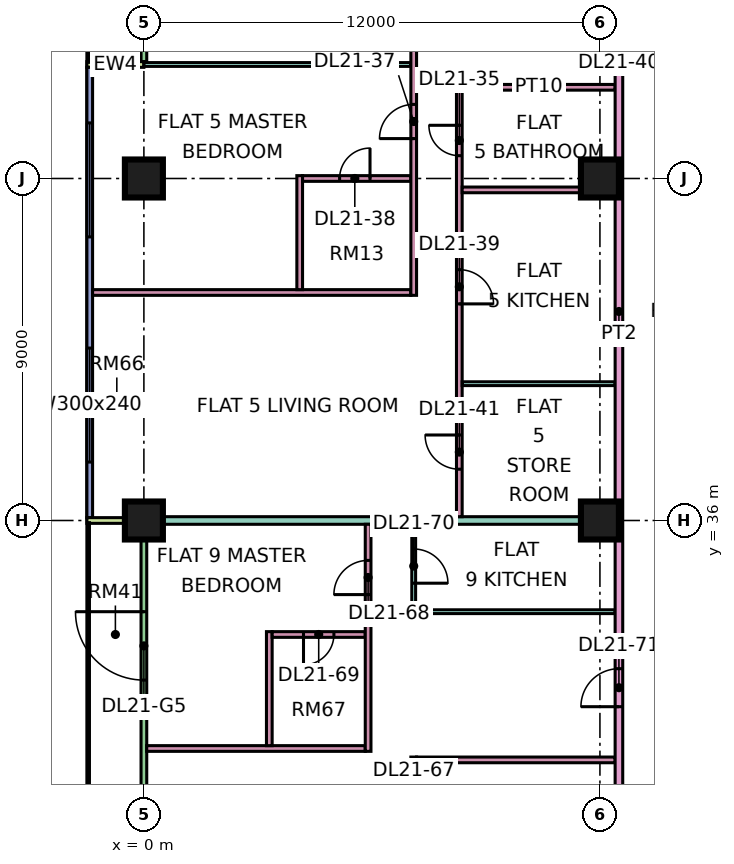
"""IFC4 building model, lengths in metres.
Left out: names, types, materials, properties, quantities, classifications, styles, units other than length and angle.
Written with IfcOpenShell. Run it as: python <this file> out.ifc"""

import sys

from ifc_helpers import new_model, si_unit, direction, frame, frame_2d, origin, origin_2d, place, context, subcontext, project, spatial, rectangle, extrude, element, fill, save


model = new_model("IFC4")
c1 = context("Model", 3, precision=1e-05, world=origin(), true_north=direction((0.0, 1.0)))
c2 = subcontext(c1, "Body", "Model", "MODEL_VIEW")
j1 = project(units=[si_unit("LENGTHUNIT", "METRE"), si_unit("PLANEANGLEUNIT", "RADIAN")], contexts=[c1])
p1 = place(None, origin())
s1 = spatial("IfcSite", under=j1, at=p1, CompositionType="ELEMENT")
p2 = place(p1, origin())
s2 = spatial("IfcBuilding", under=s1, at=p2, CompositionType="ELEMENT")
p3 = place(p2, frame((0.0, 0.0, 95.65)))
s3 = spatial("IfcBuildingStorey", under=s2, at=p3, CompositionType="ELEMENT", Elevation=95.65)
p4 = place(p3, frame((0.0, 36.0, 0.0), z_axis=(0.0, 0.0, 1.0), x_axis=(1.0, 0.0, 0.0)))
e1 = element("IfcColumn", 1, at=p4, inside=s3, PredefinedType="COLUMN", context=c2, shape_type="SweptSolid", body=[
    extrude(rectangle(XDim=1.0, YDim=1.0, at=origin_2d()), origin(), (0.0, 0.0, 1.0), 3.75),
])
for number, where, z_axis, x_axis in (
    (2, (0.0, 45.0, 0.0), (0.0, 0.0, 1.0), (1.0, 0.0, 0.0)),
    (3, (12.0, 36.0, 0.0), (0.0, 0.0, 1.0), (1.0, 0.0, 0.0)),
    (4, (12.0, 45.0, 0.0), (0.0, 0.0, 1.0), (1.0, 0.0, 0.0)),
):
    element("IfcColumn", number, at=place(p3, frame(where, z_axis=z_axis, x_axis=x_axis)), inside=s3, PredefinedType="COLUMN", context=c2, shape_type="SweptSolid", body=[
        extrude(rectangle(XDim=1.0, YDim=1.0, at=origin_2d()), origin(), (0.0, 0.0, 1.0), 3.75),
    ])
p5 = place(p3, frame((0.0, 61.425, 0.0), z_axis=(0.0, 0.0, 1.0), x_axis=(0.0, -1.0, 0.0)))
e5 = element("IfcWall", 5, at=p5, inside=s3, PredefinedType="SOLIDWALL", context=c2, shape_type="SweptSolid", body=[
    extrude(rectangle(XDim=13.35, YDim=0.15, at=frame_2d((6.675, 0.0))), origin(), (0.0, 0.0, 1.0), 3.35),
])
p6 = place(p5, frame((2.025, 0.0, 0.0)))
e6 = element("IfcOpeningElement", 6, at=p6, cuts=e5, PredefinedType="OPENING", context=c2, shape_type="SweptSolid", body=[
    extrude(rectangle(XDim=1.8, YDim=2.4, at=frame_2d((0.9, 1.2))), frame((0.0, 0.085, 0.0), z_axis=(0.0, -1.0, 0.0), x_axis=(1.0, 0.0, 0.0)), (0.0, 0.0, 1.0), 0.17),
])
p7 = place(p5, frame((5.025, 0.0, 0.45)))
e7 = element("IfcOpeningElement", 7, at=p7, cuts=e5, PredefinedType="OPENING", context=c2, shape_type="SweptSolid", body=[
    extrude(rectangle(XDim=1.2, YDim=2.4, at=frame_2d((0.6, 1.2))), frame((0.0, 0.085, 0.0), z_axis=(0.0, -1.0, 0.0), x_axis=(1.0, 0.0, 0.0)), (0.0, 0.0, 1.0), 0.17),
])
p8 = place(p5, frame((8.625, 0.0, 0.45)))
e8 = element("IfcOpeningElement", 8, at=p8, cuts=e5, PredefinedType="OPENING", context=c2, shape_type="SweptSolid", body=[
    extrude(rectangle(XDim=1.2, YDim=2.4, at=frame_2d((0.6, 1.2))), frame((0.0, 0.085, 0.0), z_axis=(0.0, -1.0, 0.0), x_axis=(1.0, 0.0, 0.0)), (0.0, 0.0, 1.0), 0.17),
])
p9 = place(p5, frame((10.988, 0.0, 0.45)))
e9 = element("IfcOpeningElement", 9, at=p9, cuts=e5, PredefinedType="OPENING", context=c2, shape_type="SweptSolid", body=[
    extrude(rectangle(XDim=1.8, YDim=2.4, at=frame_2d((0.9, 1.2))), frame((0.0, 0.085, 0.0), z_axis=(0.0, -1.0, 0.0), x_axis=(1.0, 0.0, 0.0)), (0.0, 0.0, 1.0), 0.17),
])
p10 = place(p3, frame((-1.5, 48.0, 0.0), z_axis=(0.0, 0.0, 1.0), x_axis=(1.0, 0.0, 0.0)))
e10 = element("IfcWall", 10, at=p10, inside=s3, PredefinedType="SOLIDWALL", context=c2, shape_type="SweptSolid", body=[
    extrude(rectangle(XDim=1.5, YDim=0.15, at=frame_2d((0.75, 0.0))), origin(), (0.0, 0.0, 1.0), 3.35),
])
p11 = place(p3, frame((-1.425, 47.925, 0.0), z_axis=(0.0, 0.0, 1.0), x_axis=(0.0, -1.0, 0.0)))
e11 = element("IfcWall", 11, at=p11, inside=s3, PredefinedType="SOLIDWALL", context=c2, shape_type="SweptSolid", body=[
    extrude(rectangle(XDim=11.85, YDim=0.15, at=frame_2d((5.925, 0.0))), origin(), (0.0, 0.0, 1.0), 3.35),
])
p12 = place(p11, frame((1.462, 0.0, 0.45)))
e12 = element("IfcOpeningElement", 12, at=p12, cuts=e11, PredefinedType="OPENING", context=c2, shape_type="SweptSolid", body=[
    extrude(rectangle(XDim=3.0, YDim=2.4, at=frame_2d((1.5, 1.2))), frame((0.0, 0.085, 0.0), z_axis=(0.0, -1.0, 0.0), x_axis=(1.0, 0.0, 0.0)), (0.0, 0.0, 1.0), 0.17),
])
p13 = place(p11, frame((7.387, 0.0, 0.45)))
e13 = element("IfcOpeningElement", 13, at=p13, cuts=e11, PredefinedType="OPENING", context=c2, shape_type="SweptSolid", body=[
    extrude(rectangle(XDim=3.0, YDim=2.4, at=frame_2d((1.5, 1.2))), frame((0.0, 0.085, 0.0), z_axis=(0.0, -1.0, 0.0), x_axis=(1.0, 0.0, 0.0)), (0.0, 0.0, 1.0), 0.17),
])
p14 = place(p3, frame((0.0, 35.925, 0.0), z_axis=(0.0, 0.0, 1.0), x_axis=(0.0, -1.0, 0.0)))
e14 = element("IfcWall", 14, at=p14, inside=s3, PredefinedType="SOLIDWALL", context=c2, shape_type="SweptSolid", body=[
    extrude(rectangle(XDim=11.85, YDim=0.15, at=frame_2d((5.925, 0.0))), origin(), (0.0, 0.0, 1.0), 3.35),
])
p15 = place(p14, frame((2.325, 0.0, 0.0)))
e15 = element("IfcOpeningElement", 15, at=p15, cuts=e14, PredefinedType="OPENING", context=c2, shape_type="SweptSolid", body=[
    extrude(rectangle(XDim=1.8, YDim=2.4, at=frame_2d((0.9, 1.2))), frame((0.0, 0.085, 0.0), z_axis=(0.0, -1.0, 0.0), x_axis=(1.0, 0.0, 0.0)), (0.0, 0.0, 1.0), 0.17),
])
p16 = place(p14, frame((7.125, 0.0, 0.45)))
e16 = element("IfcOpeningElement", 16, at=p16, cuts=e14, PredefinedType="OPENING", context=c2, shape_type="SweptSolid", body=[
    extrude(rectangle(XDim=3.0, YDim=2.4, at=frame_2d((1.5, 1.2))), frame((0.0, 0.085, 0.0), z_axis=(0.0, -1.0, 0.0), x_axis=(1.0, 0.0, 0.0)), (0.0, 0.0, 1.0), 0.17),
])
p17 = place(p3, frame((-1.5, 36.0, 0.0), z_axis=(0.0, 0.0, 1.0), x_axis=(1.0, 0.0, 0.0)))
e17 = element("IfcWall", 17, at=p17, inside=s3, PredefinedType="SOLIDWALL", context=c2, shape_type="SweptSolid", body=[
    extrude(rectangle(XDim=1.5, YDim=0.15, at=frame_2d((0.75, 0.0))), origin(), (0.0, 0.0, 1.0), 3.35),
])
e18 = element("IfcWall", 18, at=p4, inside=s3, PredefinedType="PARTITIONING", context=c2, shape_type="SweptSolid", body=[
    extrude(rectangle(XDim=12.4, YDim=0.2, at=frame_2d((6.2, 0.0))), origin(), (0.0, 0.0, 1.0), 3.35),
])
p18 = place(p3, frame((-1.35, 42.0, 0.0), z_axis=(0.0, 0.0, 1.0), x_axis=(1.0, 0.0, 0.0)))
e19 = element("IfcWall", 19, at=p18, inside=s3, PredefinedType="PARTITIONING", context=c2, shape_type="SweptSolid", body=[
    extrude(rectangle(XDim=8.375, YDim=0.15, at=frame_2d((4.188, 0.0))), origin(), (0.0, 0.0, 1.0), 3.35),
])
p19 = place(p3, frame((0.0, 48.0, 0.0), z_axis=(0.0, 0.0, 1.0), x_axis=(1.0, 0.0, 0.0)))
e20 = element("IfcWall", 20, at=p19, inside=s3, PredefinedType="PARTITIONING", context=c2, shape_type="SweptSolid", body=[
    extrude(rectangle(XDim=7.025, YDim=0.1, at=frame_2d((3.512, 0.0))), origin(), (0.0, 0.0, 1.0), 3.35),
])
p20 = place(p3, frame((0.074, 30.0, 0.0), z_axis=(0.0, 0.0, 1.0), x_axis=(1.0, 0.0, 0.0)))
e21 = element("IfcWall", 21, at=p20, inside=s3, PredefinedType="PARTITIONING", context=c2, shape_type="SweptSolid", body=[
    extrude(rectangle(XDim=5.751, YDim=0.15, at=frame_2d((2.875, 0.0))), origin(), (0.0, 0.0, 1.0), 3.35),
])
p21 = place(p3, frame((3.3, 30.075, 0.0), z_axis=(0.0, 0.0, 1.0), x_axis=(0.0, 1.0, 0.0)))
e22 = element("IfcWall", 22, at=p21, inside=s3, PredefinedType="PARTITIONING", context=c2, shape_type="SweptSolid", body=[
    extrude(rectangle(XDim=3.0, YDim=0.15, at=frame_2d((1.5, 0.0))), origin(), (0.0, 0.0, 1.0), 3.35),
])
p22 = place(p3, frame((3.375, 33.0, 0.0), z_axis=(0.0, 0.0, 1.0), x_axis=(1.0, 0.0, 0.0)))
e23 = element("IfcWall", 23, at=p22, inside=s3, PredefinedType="PARTITIONING", context=c2, shape_type="SweptSolid", body=[
    extrude(rectangle(XDim=2.45, YDim=0.15, at=frame_2d((1.225, 0.0))), origin(), (0.0, 0.0, 1.0), 3.35),
])
p23 = place(p22, frame((0.825, 0.0, 0.0)))
e24 = element("IfcOpeningElement", 24, at=p23, cuts=e23, PredefinedType="OPENING", context=c2, shape_type="SweptSolid", body=[
    extrude(rectangle(XDim=0.8, YDim=2.1, at=frame_2d((0.4, 1.05))), frame((0.0, 0.085, 0.0), z_axis=(0.0, -1.0, 0.0), x_axis=(1.0, 0.0, 0.0)), (0.0, 0.0, 1.0), 0.17),
])
p24 = place(p3, frame((4.1, 42.075, 0.0), z_axis=(0.0, 0.0, 1.0), x_axis=(0.0, 1.0, 0.0)))
e25 = element("IfcWall", 25, at=p24, inside=s3, PredefinedType="PARTITIONING", context=c2, shape_type="SweptSolid", body=[
    extrude(rectangle(XDim=3.0, YDim=0.15, at=frame_2d((1.5, 0.0))), origin(), (0.0, 0.0, 1.0), 3.35),
])
p25 = place(p3, frame((4.175, 45.0, 0.0), z_axis=(0.0, 0.0, 1.0), x_axis=(1.0, 0.0, 0.0)))
e26 = element("IfcWall", 26, at=p25, inside=s3, PredefinedType="PARTITIONING", context=c2, shape_type="SweptSolid", body=[
    extrude(rectangle(XDim=2.85, YDim=0.15, at=frame_2d((1.425, 0.0))), origin(), (0.0, 0.0, 1.0), 3.35),
])
p26 = place(p25, frame((0.975, 0.0, 0.0)))
e27 = element("IfcOpeningElement", 27, at=p26, cuts=e26, PredefinedType="OPENING", context=c2, shape_type="SweptSolid", body=[
    extrude(rectangle(XDim=0.8, YDim=2.1, at=frame_2d((0.4, 1.05))), frame((0.0, 0.085, 0.0), z_axis=(0.0, -1.0, 0.0), x_axis=(1.0, 0.0, 0.0)), (0.0, 0.0, 1.0), 0.17),
])
p27 = place(p3, frame((5.9, 29.925, 0.0), z_axis=(0.0, 0.0, 1.0), x_axis=(0.0, 1.0, 0.0)))
e28 = element("IfcWall", 28, at=p27, inside=s3, PredefinedType="PARTITIONING", context=c2, shape_type="SweptSolid", body=[
    extrude(rectangle(XDim=5.975, YDim=0.15, at=frame_2d((2.987, 0.0))), origin(), (0.0, 0.0, 1.0), 3.35),
])
p28 = place(p27, frame((4.125, 0.0, 0.0)))
e29 = element("IfcOpeningElement", 29, at=p28, cuts=e28, PredefinedType="OPENING", context=c2, shape_type="SweptSolid", body=[
    extrude(rectangle(XDim=0.9, YDim=2.1, at=frame_2d((0.45, 1.05))), frame((0.0, 0.085, 0.0), z_axis=(0.0, -1.0, 0.0), x_axis=(1.0, 0.0, 0.0)), (0.0, 0.0, 1.0), 0.17),
])
p29 = place(p3, frame((7.05, 33.6, 0.0), z_axis=(0.0, 0.0, 1.0), x_axis=(1.0, 0.0, 0.0)))
e30 = element("IfcWall", 30, at=p29, inside=s3, PredefinedType="PARTITIONING", context=c2, shape_type="SweptSolid", body=[
    extrude(rectangle(XDim=5.35, YDim=0.1, at=frame_2d((2.675, 0.0))), origin(), (0.0, 0.0, 1.0), 3.35),
])
p30 = place(p3, frame((7.1, 22.5, 0.0), z_axis=(0.0, 0.0, 1.0), x_axis=(0.0, 1.0, 0.0)))
e31 = element("IfcWall", 31, at=p30, inside=s3, PredefinedType="PARTITIONING", context=c2, shape_type="SweptSolid", body=[
    extrude(rectangle(XDim=7.275, YDim=0.15, at=frame_2d((3.637, 0.0))), origin(), (0.0, 0.0, 1.0), 3.35),
])
p31 = place(p30, frame((5.4, 0.0, 0.0)))
e32 = element("IfcOpeningElement", 32, at=p31, cuts=e31, PredefinedType="OPENING", context=c2, shape_type="SweptSolid", body=[
    extrude(rectangle(XDim=0.8, YDim=2.1, at=frame_2d((0.4, 1.05))), frame((0.0, 0.085, 0.0), z_axis=(0.0, -1.0, 0.0), x_axis=(1.0, 0.0, 0.0)), (0.0, 0.0, 1.0), 0.17),
])
p32 = place(p30, frame((1.7, 0.0, 0.0)))
e33 = element("IfcOpeningElement", 33, at=p32, cuts=e31, PredefinedType="OPENING", context=c2, shape_type="SweptSolid", body=[
    extrude(rectangle(XDim=0.9, YDim=2.1, at=frame_2d((0.45, 1.05))), frame((0.0, 0.085, 0.0), z_axis=(0.0, -1.0, 0.0), x_axis=(1.0, 0.0, 0.0)), (0.0, 0.0, 1.0), 0.17),
])
p33 = place(p3, frame((7.1, 33.65, 0.0), z_axis=(0.0, 0.0, 1.0), x_axis=(0.0, 1.0, 0.0)))
e34 = element("IfcWall", 34, at=p33, inside=s3, PredefinedType="PARTITIONING", context=c2, shape_type="SweptSolid", body=[
    extrude(rectangle(XDim=2.25, YDim=0.1, at=frame_2d((1.125, 0.0))), origin(), (0.0, 0.0, 1.0), 3.35),
])
p34 = place(p33, frame((0.7, 0.0, 0.0)))
e35 = element("IfcOpeningElement", 35, at=p34, cuts=e34, PredefinedType="OPENING", context=c2, shape_type="SweptSolid", body=[
    extrude(rectangle(XDim=0.9, YDim=2.1, at=frame_2d((0.45, 1.05))), frame((0.0, 0.06, 0.0), z_axis=(0.0, -1.0, 0.0), x_axis=(1.0, 0.0, 0.0)), (0.0, 0.0, 1.0), 0.12),
])
p35 = place(p3, frame((7.1, 41.925, 0.0), z_axis=(0.0, 0.0, 1.0), x_axis=(0.0, 1.0, 0.0)))
e36 = element("IfcWall", 36, at=p35, inside=s3, PredefinedType="PARTITIONING", context=c2, shape_type="SweptSolid", body=[
    extrude(rectangle(XDim=8.975, YDim=0.15, at=frame_2d((4.487, 0.0))), origin(), (0.0, 0.0, 1.0), 3.35),
])
p36 = place(p35, frame((7.125, 0.0, 0.0)))
e37 = element("IfcOpeningElement", 37, at=p36, cuts=e36, PredefinedType="OPENING", context=c2, shape_type="SweptSolid", body=[
    extrude(rectangle(XDim=0.9, YDim=2.1, at=frame_2d((0.45, 1.05))), frame((0.0, 0.085, 0.0), z_axis=(0.0, -1.0, 0.0), x_axis=(1.0, 0.0, 0.0)), (0.0, 0.0, 1.0), 0.17),
])
p37 = place(p35, frame((4.125, 0.0, 0.0)))
e38 = element("IfcOpeningElement", 38, at=p37, cuts=e36, PredefinedType="OPENING", context=c2, shape_type="SweptSolid", body=[
    extrude(rectangle(XDim=0.9, YDim=2.1, at=frame_2d((0.45, 1.05))), frame((0.0, 0.085, 0.0), z_axis=(0.0, -1.0, 0.0), x_axis=(1.0, 0.0, 0.0)), (0.0, 0.0, 1.0), 0.17),
])
p38 = place(p3, frame((7.175, 29.7, 0.0), z_axis=(0.0, 0.0, 1.0), x_axis=(1.0, 0.0, 0.0)))
e39 = element("IfcWall", 39, at=p38, inside=s3, PredefinedType="PARTITIONING", context=c2, shape_type="SweptSolid", body=[
    extrude(rectangle(XDim=5.225, YDim=0.15, at=frame_2d((2.612, 0.0))), origin(), (0.0, 0.0, 1.0), 3.35),
])
p39 = place(p3, frame((8.3, 36.1, 0.0), z_axis=(0.0, 0.0, 1.0), x_axis=(0.0, 1.0, 0.0)))
e40 = element("IfcWall", 40, at=p39, inside=s3, PredefinedType="PARTITIONING", context=c2, shape_type="SweptSolid", body=[
    extrude(rectangle(XDim=11.375, YDim=0.15, at=frame_2d((5.688, 0.0))), origin(), (0.0, 0.0, 1.0), 3.35),
])
p40 = place(p39, frame((9.5, 0.0, 0.0)))
e41 = element("IfcOpeningElement", 41, at=p40, cuts=e40, PredefinedType="OPENING", context=c2, shape_type="SweptSolid", body=[
    extrude(rectangle(XDim=0.8, YDim=2.1, at=frame_2d((0.4, 1.05))), frame((0.0, 0.085, 0.0), z_axis=(0.0, -1.0, 0.0), x_axis=(1.0, 0.0, 0.0)), (0.0, 0.0, 1.0), 0.17),
])
p41 = place(p39, frame((5.6, 0.0, 0.0)))
e42 = element("IfcOpeningElement", 42, at=p41, cuts=e40, PredefinedType="OPENING", context=c2, shape_type="SweptSolid", body=[
    extrude(rectangle(XDim=0.9, YDim=2.1, at=frame_2d((0.45, 1.05))), frame((0.0, 0.085, 0.0), z_axis=(0.0, -1.0, 0.0), x_axis=(1.0, 0.0, 0.0)), (0.0, 0.0, 1.0), 0.17),
])
p42 = place(p39, frame((1.25, 0.0, 0.0)))
e43 = element("IfcOpeningElement", 43, at=p42, cuts=e40, PredefinedType="OPENING", context=c2, shape_type="SweptSolid", body=[
    extrude(rectangle(XDim=0.9, YDim=2.1, at=frame_2d((0.45, 1.05))), frame((0.0, 0.085, 0.0), z_axis=(0.0, -1.0, 0.0), x_axis=(1.0, 0.0, 0.0)), (0.0, 0.0, 1.0), 0.17),
])
p43 = place(p3, frame((8.375, 39.6, 0.0), z_axis=(0.0, 0.0, 1.0), x_axis=(1.0, 0.0, 0.0)))
e44 = element("IfcWall", 44, at=p43, inside=s3, PredefinedType="PARTITIONING", context=c2, shape_type="SweptSolid", body=[
    extrude(rectangle(XDim=4.025, YDim=0.1, at=frame_2d((2.012, 0.0))), origin(), (0.0, 0.0, 1.0), 3.35),
])
for number, where, z_axis, x_axis in (
    (45, (8.375, 44.7, 0.0), (0.0, 0.0, 1.0), (1.0, 0.0, 0.0)),
    (46, (8.375, 47.4, 0.0), (0.0, 0.0, 1.0), (1.0, 0.0, 0.0)),
):
    element("IfcWall", number, at=place(p3, frame(where, z_axis=z_axis, x_axis=x_axis)), inside=s3, PredefinedType="PARTITIONING", context=c2, shape_type="SweptSolid", body=[
        extrude(rectangle(XDim=4.025, YDim=0.15, at=frame_2d((2.012, 0.0))), origin(), (0.0, 0.0, 1.0), 3.35),
    ])
p44 = place(p3, frame((12.5, 20.0, 0.0), z_axis=(0.0, 0.0, 1.0), x_axis=(0.0, 1.0, 0.0)))
e47 = element("IfcWall", 47, at=p44, inside=s3, PredefinedType="PARTITIONING", context=c2, shape_type="SweptSolid", body=[
    extrude(rectangle(XDim=43.0, YDim=0.2, at=frame_2d((21.5, 0.0))), origin(), (0.0, 0.0, 1.0), 3.35),
])
p45 = place(p44, frame((28.65, 0.0, 0.0)))
e48 = element("IfcOpeningElement", 48, at=p45, cuts=e47, PredefinedType="OPENING", context=c2, shape_type="SweptSolid", body=[
    extrude(rectangle(XDim=1.0, YDim=2.1, at=frame_2d((0.5, 1.05))), frame((0.0, 0.11, 0.0), z_axis=(0.0, -1.0, 0.0), x_axis=(1.0, 0.0, 0.0)), (0.0, 0.0, 1.0), 0.22),
])
p46 = place(p44, frame((32.1, 0.0, 0.0)))
e49 = element("IfcOpeningElement", 49, at=p46, cuts=e47, PredefinedType="OPENING", context=c2, shape_type="SweptSolid", body=[
    extrude(rectangle(XDim=1.0, YDim=2.1, at=frame_2d((0.5, 1.05))), frame((0.0, 0.11, 0.0), z_axis=(0.0, -1.0, 0.0), x_axis=(1.0, 0.0, 0.0)), (0.0, 0.0, 1.0), 0.22),
])
p47 = place(p44, frame((0.6, 0.0, 0.0)))
e50 = element("IfcOpeningElement", 50, at=p47, cuts=e47, PredefinedType="OPENING", context=c2, shape_type="SweptSolid", body=[
    extrude(rectangle(XDim=1.2, YDim=2.1, at=frame_2d((0.6, 1.05))), frame((0.0, 0.11, 0.0), z_axis=(0.0, -1.0, 0.0), x_axis=(1.0, 0.0, 0.0)), (0.0, 0.0, 1.0), 0.22),
])
p48 = place(p44, frame((11.1, 0.0, 0.0)))
e51 = element("IfcOpeningElement", 51, at=p48, cuts=e47, PredefinedType="OPENING", context=c2, shape_type="SweptSolid", body=[
    extrude(rectangle(XDim=1.0, YDim=2.1, at=frame_2d((0.5, 1.05))), frame((0.0, 0.11, 0.0), z_axis=(0.0, -1.0, 0.0), x_axis=(1.0, 0.0, 0.0)), (0.0, 0.0, 1.0), 0.22),
])
p49 = place(p12, origin())
e52 = element("IfcWindow", 52, at=p49, inside=s3, PartitioningType="SINGLE_PANEL", PredefinedType="WINDOW", context=c2, shape_type="SweptSolid", body=[
    extrude(rectangle(XDim=3.0, YDim=2.4, at=frame_2d((1.5, 1.2))), frame((0.0, 0.03, 0.0), z_axis=(0.0, -1.0, 0.0), x_axis=(1.0, 0.0, 0.0)), (0.0, 0.0, 1.0), 0.06),
])
fill(e12, e52)
p50 = place(p13, origin())
e53 = element("IfcWindow", 53, at=p50, inside=s3, PartitioningType="SINGLE_PANEL", PredefinedType="WINDOW", context=c2, shape_type="SweptSolid", body=[
    extrude(rectangle(XDim=3.0, YDim=2.4, at=frame_2d((1.5, 1.2))), frame((0.0, 0.03, 0.0), z_axis=(0.0, -1.0, 0.0), x_axis=(1.0, 0.0, 0.0)), (0.0, 0.0, 1.0), 0.06),
])
fill(e13, e53)
p51 = place(p15, frame((1.8, 0.0, 0.0), z_axis=(0.0, 0.0, 1.0), x_axis=(-1.0, 0.0, 0.0)))
e54 = element("IfcDoor", 54, at=p51, inside=s3, OperationType="DOUBLE_DOOR_SINGLE_SWING", PredefinedType="DOOR", context=c2, shape_type="SweptSolid", body=[
    extrude(rectangle(XDim=1.8, YDim=2.4, at=frame_2d((0.9, 1.2))), frame((0.0, 0.025, 0.0), z_axis=(0.0, -1.0, 0.0), x_axis=(1.0, 0.0, 0.0)), (0.0, 0.0, 1.0), 0.05),
])
fill(e15, e54)
p52 = place(p40, frame((0.8, 0.0, 0.0), z_axis=(0.0, 0.0, 1.0), x_axis=(-1.0, 0.0, 0.0)))
e55 = element("IfcDoor", 55, at=p52, inside=s3, OperationType="SINGLE_SWING_RIGHT", PredefinedType="DOOR", context=c2, shape_type="SweptSolid", body=[
    extrude(rectangle(XDim=0.8, YDim=2.1, at=frame_2d((0.4, 1.05))), frame((0.0, 0.025, 0.0), z_axis=(0.0, -1.0, 0.0), x_axis=(1.0, 0.0, 0.0)), (0.0, 0.0, 1.0), 0.05),
])
fill(e41, e55)
p53 = place(p37, origin())
e56 = element("IfcDoor", 56, at=p53, inside=s3, OperationType="SINGLE_SWING_LEFT", PredefinedType="DOOR", context=c2, shape_type="SweptSolid", body=[
    extrude(rectangle(XDim=0.9, YDim=2.1, at=frame_2d((0.45, 1.05))), frame((0.0, 0.025, 0.0), z_axis=(0.0, -1.0, 0.0), x_axis=(1.0, 0.0, 0.0)), (0.0, 0.0, 1.0), 0.05),
])
fill(e38, e56)
p54 = place(p26, frame((0.8, 0.0, 0.0), z_axis=(0.0, 0.0, 1.0), x_axis=(-1.0, 0.0, 0.0)))
e57 = element("IfcDoor", 57, at=p54, inside=s3, OperationType="SINGLE_SWING_RIGHT", PredefinedType="DOOR", context=c2, shape_type="SweptSolid", body=[
    extrude(rectangle(XDim=0.8, YDim=2.1, at=frame_2d((0.4, 1.05))), frame((0.0, 0.025, 0.0), z_axis=(0.0, -1.0, 0.0), x_axis=(1.0, 0.0, 0.0)), (0.0, 0.0, 1.0), 0.05),
])
fill(e27, e57)
p55 = place(p41, frame((0.9, 0.0, 0.0), z_axis=(0.0, 0.0, 1.0), x_axis=(-1.0, 0.0, 0.0)))
e58 = element("IfcDoor", 58, at=p55, inside=s3, OperationType="SINGLE_SWING_LEFT", PredefinedType="DOOR", context=c2, shape_type="SweptSolid", body=[
    extrude(rectangle(XDim=0.9, YDim=2.1, at=frame_2d((0.45, 1.05))), frame((0.0, 0.025, 0.0), z_axis=(0.0, -1.0, 0.0), x_axis=(1.0, 0.0, 0.0)), (0.0, 0.0, 1.0), 0.05),
])
fill(e42, e58)
p56 = place(p42, frame((0.9, 0.0, 0.0), z_axis=(0.0, 0.0, 1.0), x_axis=(-1.0, 0.0, 0.0)))
e59 = element("IfcDoor", 59, at=p56, inside=s3, OperationType="SINGLE_SWING_RIGHT", PredefinedType="DOOR", context=c2, shape_type="SweptSolid", body=[
    extrude(rectangle(XDim=0.9, YDim=2.1, at=frame_2d((0.45, 1.05))), frame((0.0, 0.025, 0.0), z_axis=(0.0, -1.0, 0.0), x_axis=(1.0, 0.0, 0.0)), (0.0, 0.0, 1.0), 0.05),
])
fill(e43, e59)
p57 = place(p28, origin())
e60 = element("IfcDoor", 60, at=p57, inside=s3, OperationType="SINGLE_SWING_LEFT", PredefinedType="DOOR", context=c2, shape_type="SweptSolid", body=[
    extrude(rectangle(XDim=0.9, YDim=2.1, at=frame_2d((0.45, 1.05))), frame((0.0, 0.025, 0.0), z_axis=(0.0, -1.0, 0.0), x_axis=(1.0, 0.0, 0.0)), (0.0, 0.0, 1.0), 0.05),
])
fill(e29, e60)
p58 = place(p23, frame((0.8, 0.0, 0.0), z_axis=(0.0, 0.0, 1.0), x_axis=(-1.0, 0.0, 0.0)))
e61 = element("IfcDoor", 61, at=p58, inside=s3, OperationType="SINGLE_SWING_LEFT", PredefinedType="DOOR", context=c2, shape_type="SweptSolid", body=[
    extrude(rectangle(XDim=0.8, YDim=2.1, at=frame_2d((0.4, 1.05))), frame((0.0, 0.025, 0.0), z_axis=(0.0, -1.0, 0.0), x_axis=(1.0, 0.0, 0.0)), (0.0, 0.0, 1.0), 0.05),
])
fill(e24, e61)
p59 = place(p34, frame((0.9, 0.0, 0.0), z_axis=(0.0, 0.0, 1.0), x_axis=(-1.0, 0.0, 0.0)))
e62 = element("IfcDoor", 62, at=p59, inside=s3, OperationType="SINGLE_SWING_LEFT", PredefinedType="DOOR", context=c2, shape_type="SweptSolid", body=[
    extrude(rectangle(XDim=0.9, YDim=2.1, at=frame_2d((0.45, 1.05))), frame((0.0, 0.025, 0.0), z_axis=(0.0, -1.0, 0.0), x_axis=(1.0, 0.0, 0.0)), (0.0, 0.0, 1.0), 0.05),
])
fill(e35, e62)
p60 = place(p48, origin())
e63 = element("IfcDoor", 63, at=p60, inside=s3, OperationType="SINGLE_SWING_LEFT", PredefinedType="DOOR", context=c2, shape_type="SweptSolid", body=[
    extrude(rectangle(XDim=1.0, YDim=2.1, at=frame_2d((0.5, 1.05))), frame((0.0, 0.025, 0.0), z_axis=(0.0, -1.0, 0.0), x_axis=(1.0, 0.0, 0.0)), (0.0, 0.0, 1.0), 0.05),
])
fill(e51, e63)
save(model, sys.argv[1])
